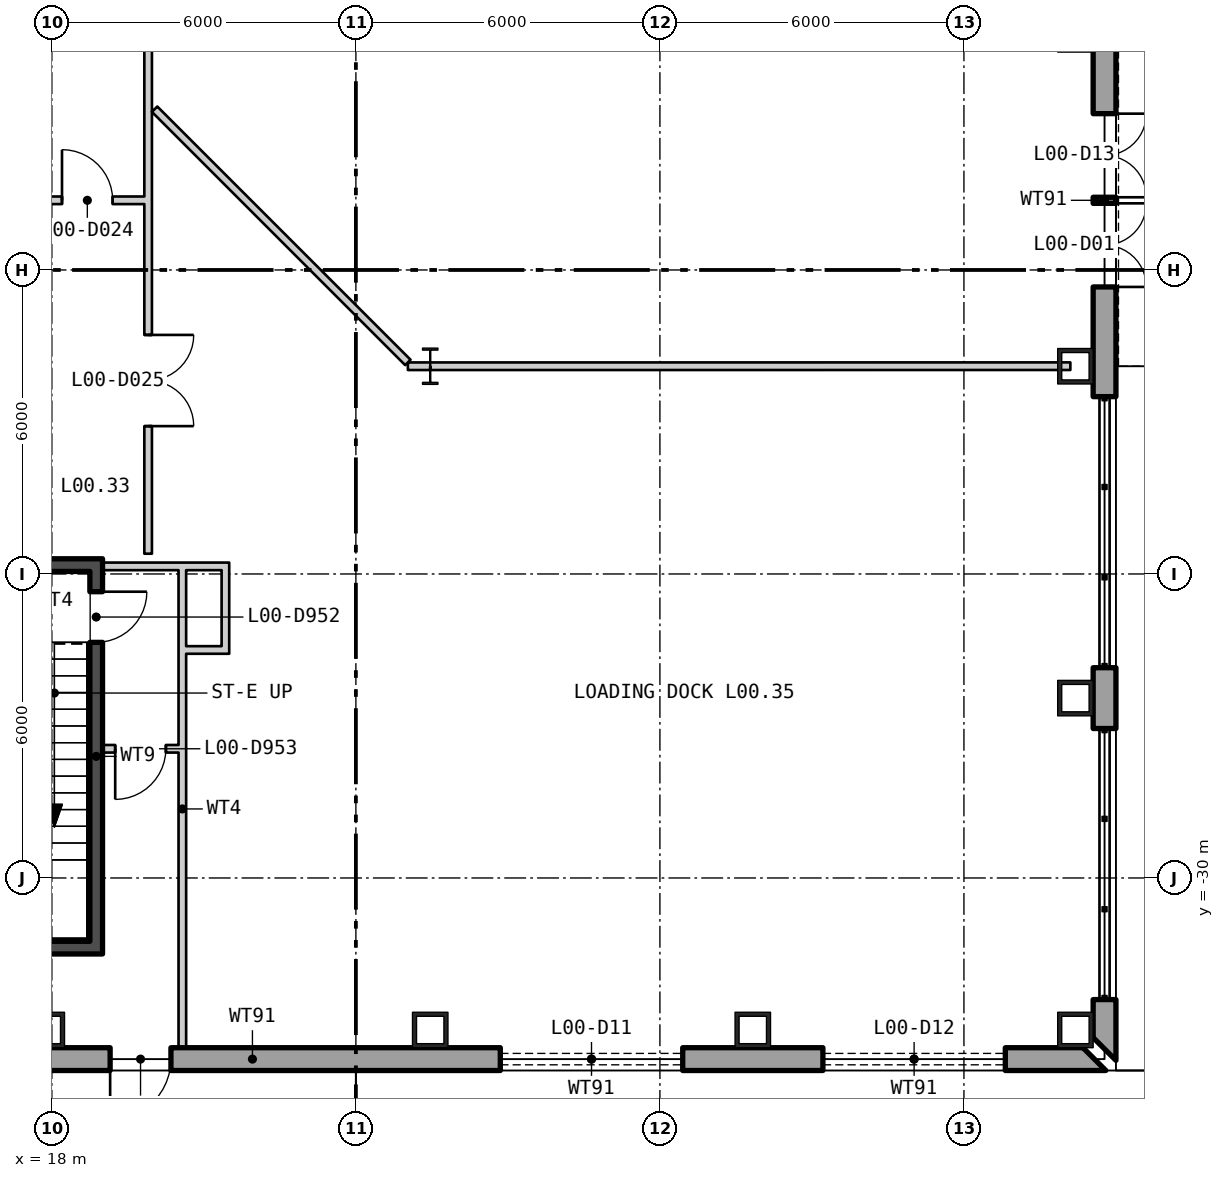
"""IFC4 building model, lengths in metres.
Left out: names, types, materials, properties, quantities, classifications, styles, units other than length and angle.
Written with IfcOpenShell. Run it as: python <this file> out.ifc"""

import sys

from ifc_helpers import new_model, si_unit, direction, frame, frame_2d, origin, origin_2d, place, context, subcontext, project, spatial, polyline, rectangle, hollow_rectangle, i_section, outline, extrude, element, fill, save


model = new_model("IFC4")
c1 = context("Model", 3, precision=1e-05, world=origin(), true_north=direction((0.0, 1.0)))
c2 = subcontext(c1, "Body", "Model", "MODEL_VIEW")
j1 = project(units=[si_unit("LENGTHUNIT", "METRE"), si_unit("PLANEANGLEUNIT", "RADIAN")], contexts=[c1])
p1 = place(None, origin())
s1 = spatial("IfcSite", under=j1, at=p1, CompositionType="ELEMENT")
p2 = place(p1, origin())
s2 = spatial("IfcBuilding", under=s1, at=p2, CompositionType="ELEMENT")
p3 = place(p2, origin())
s3 = spatial("IfcBuildingStorey", under=s2, at=p3, CompositionType="ELEMENT", Elevation=0.0)
for number, where, z_axis, x_axis in (
    (1, (38.2, -33.0, 0.0), (0.0, 0.0, 1.0), (0.0, 1.0, 0.0)),
    (2, (38.2, -26.45, 0.0), (0.0, 0.0, 1.0), (0.0, 1.0, 0.0)),
    (3, (38.2, -19.9, 0.0), (0.0, 0.0, 1.0), (0.0, 1.0, 0.0)),
    (4, (17.9, -33.0, 0.0), (0.0, 0.0, 1.0), (1.0, 0.0, 0.0)),
    (5, (25.467, -33.0, 0.0), (0.0, 0.0, 1.0), (1.0, 0.0, 0.0)),
    (6, (31.833, -33.0, 0.0), (0.0, 0.0, 1.0), (1.0, 0.0, 0.0)),
):
    element("IfcColumn", number, at=place(p3, frame(where, z_axis=z_axis, x_axis=x_axis)), inside=s3, PredefinedType="COLUMN", context=c2, shape_type="SweptSolid", body=[
        extrude(hollow_rectangle(XDim=0.7, YDim=0.7, WallThickness=0.08, at=origin_2d()), origin(), (0.0, 0.0, 1.0), 8.4),
    ])
p4 = place(p3, frame((25.467, -19.9, 0.0), z_axis=(0.0, 0.0, 1.0), x_axis=(1.0, 0.0, 0.0)))
e7 = element("IfcColumn", 7, at=p4, inside=s3, PredefinedType="COLUMN", context=c2, shape_type="SweptSolid", body=[
    extrude(i_section(OverallWidth=0.304, OverallDepth=0.716, WebThickness=0.021, FlangeThickness=0.04, at=origin_2d()), origin(), (0.0, 0.0, 1.0), 8.4),
])
p5 = place(p3, frame((38.775, -33.575, 5.4), z_axis=(0.0, 0.0, 1.0), x_axis=(0.0, 1.0, 0.0)))
e8 = element("IfcWall", 8, at=p5, inside=s3, PredefinedType="SOLIDWALL", context=c2, shape_type="SweptSolid", body=[
    extrude(outline(polyline([(-0.225, -0.225), (53.775, -0.225), (53.325, 0.225), (0.225, 0.225), (-0.225, -0.225)])), origin(), (0.0, 0.0, 1.0), 2.6),
])
p6 = place(p3, frame((38.775, -33.375, -0.4), z_axis=(0.0, 0.0, 1.0), x_axis=(0.0, 1.0, 0.0)))
e9 = element("IfcWall", 9, at=p6, inside=s3, PredefinedType="SOLIDWALL", context=c2, shape_type="SweptSolid", body=[
    extrude(outline(polyline([(-0.225, -0.225), (0.975, -0.225), (0.975, 0.225), (0.225, 0.225), (-0.225, -0.225)])), origin(), (0.0, 0.0, 1.0), 5.8),
])
p7 = place(p3, frame((38.775, -27.05, -0.4), z_axis=(0.0, 0.0, 1.0), x_axis=(0.0, 1.0, 0.0)))
e10 = element("IfcWall", 10, at=p7, inside=s3, PredefinedType="SOLIDWALL", context=c2, shape_type="SweptSolid", body=[
    extrude(outline(polyline([(0.0, -0.225), (1.2, -0.225), (1.2, 0.225), (0.0, 0.225), (0.0, -0.225)])), origin(), (0.0, 0.0, 1.0), 5.8),
])
for number, where, z_axis, x_axis in (
    (11, (38.775, -20.5, -0.4), (0.0, 0.0, 1.0), (0.0, 1.0, 0.0)),
    (12, (38.775, -13.95, -0.4), (0.0, 0.0, 1.0), (0.0, 1.0, 0.0)),
):
    element("IfcWall", number, at=place(p3, frame(where, z_axis=z_axis, x_axis=x_axis)), inside=s3, PredefinedType="SOLIDWALL", context=c2, shape_type="SweptSolid", body=[
        extrude(outline(polyline([(0.0, -0.225), (1.2, -0.225), (1.2, 0.225), (0.0, 0.225), (0.0, -0.225)])), origin(), (0.0, 0.0, 1.0), 5.51),
    ])
for number, where, z_axis, x_axis in (
    (13, (38.775, -32.4, -0.4), (0.0, 0.0, 1.0), (0.0, 1.0, 0.0)),
    (14, (38.775, -25.85, -0.4), (0.0, 0.0, 1.0), (0.0, 1.0, 0.0)),
):
    element("IfcWall", number, at=place(p3, frame(where, z_axis=z_axis, x_axis=x_axis)), inside=s3, PredefinedType="SOLIDWALL", context=c2, shape_type="SweptSolid", body=[
        extrude(outline(polyline([(0.0, -0.225), (5.35, -0.225), (5.35, 0.225), (0.0, 0.225), (0.0, -0.225)])), origin(), (0.0, 0.0, 1.0), 1.0),
    ])
p8 = place(p3, frame((38.775, -19.3, -0.4), z_axis=(0.0, 0.0, 1.0), x_axis=(0.0, 1.0, 0.0)))
e15 = element("IfcWall", 15, at=p8, inside=s3, PredefinedType="SOLIDWALL", context=c2, shape_type="SweptSolid", body=[
    extrude(outline(polyline([(0.0, -0.225), (5.35, -0.225), (5.35, 0.225), (0.0, 0.225), (0.0, -0.225)])), origin(), (0.0, 0.0, 1.0), 5.8),
])
p9 = place(p8, frame((0.965, 0.0, 0.4)))
e16 = element("IfcOpeningElement", 16, at=p9, cuts=e15, PredefinedType="OPENING", context=c2, shape_type="SweptSolid", body=[
    extrude(rectangle(XDim=1.65, YDim=3.0, at=frame_2d((0.825, 1.5))), frame((0.0, 0.235, 0.0), z_axis=(0.0, -1.0, 0.0), x_axis=(1.0, 0.0, 0.0)), (0.0, 0.0, 1.0), 0.47),
])
p10 = place(p8, frame((2.735, 0.0, 0.4)))
e17 = element("IfcOpeningElement", 17, at=p10, cuts=e15, PredefinedType="OPENING", context=c2, shape_type="SweptSolid", body=[
    extrude(rectangle(XDim=1.65, YDim=3.0, at=frame_2d((0.825, 1.5))), frame((0.0, 0.235, 0.0), z_axis=(0.0, -1.0, 0.0), x_axis=(1.0, 0.0, 0.0)), (0.0, 0.0, 1.0), 0.47),
])
p11 = place(p3, frame((-38.775, -33.575, 5.4), z_axis=(0.0, 0.0, 1.0), x_axis=(1.0, 0.0, 0.0)))
e18 = element("IfcWall", 18, at=p11, inside=s3, PredefinedType="SOLIDWALL", context=c2, shape_type="SweptSolid", body=[
    extrude(outline(polyline([(-0.225, -0.225), (77.775, -0.225), (77.325, 0.225), (0.225, 0.225), (-0.225, -0.225)])), origin(), (0.0, 0.0, 1.0), 2.6),
])
p12 = place(p3, frame((18.5, -33.575, -0.4), z_axis=(0.0, 0.0, 1.0), x_axis=(1.0, 0.0, 0.0)))
e19 = element("IfcWall", 19, at=p12, inside=s3, PredefinedType="SOLIDWALL", context=c2, shape_type="SweptSolid", body=[
    extrude(outline(polyline([(0.0, -0.225), (0.55, -0.225), (0.55, 0.225), (0.0, 0.225), (0.0, -0.225)])), origin(), (0.0, 0.0, 1.0), 5.8),
])
for number, where, z_axis, x_axis in (
    (20, (24.867, -33.575, -0.4), (0.0, 0.0, 1.0), (1.0, 0.0, 0.0)),
    (21, (31.233, -33.575, -0.4), (0.0, 0.0, 1.0), (1.0, 0.0, 0.0)),
):
    element("IfcWall", number, at=place(p3, frame(where, z_axis=z_axis, x_axis=x_axis)), inside=s3, PredefinedType="SOLIDWALL", context=c2, shape_type="SweptSolid", body=[
        extrude(outline(polyline([(0.0, -0.225), (1.2, -0.225), (1.2, 0.225), (0.0, 0.225), (0.0, -0.225)])), origin(), (0.0, 0.0, 1.0), 5.8),
    ])
p13 = place(p3, frame((37.6, -33.575, -0.4), z_axis=(0.0, 0.0, 1.0), x_axis=(1.0, 0.0, 0.0)))
e22 = element("IfcWall", 22, at=p13, inside=s3, PredefinedType="SOLIDWALL", context=c2, shape_type="SweptSolid", body=[
    extrude(outline(polyline([(0.0, -0.225), (1.2, -0.225), (0.75, 0.225), (0.0, 0.225), (0.0, -0.225)])), origin(), (0.0, 0.0, 1.0), 5.8),
])
p14 = place(p3, frame((13.333, -33.575, -0.4), z_axis=(0.0, 0.0, 1.0), x_axis=(1.0, 0.0, 0.0)))
e23 = element("IfcWall", 23, at=p14, inside=s3, PredefinedType="SOLIDWALL", context=c2, shape_type="SweptSolid", body=[
    extrude(outline(polyline([(0.0, -0.225), (5.167, -0.225), (5.167, 0.225), (0.0, 0.225), (0.0, -0.225)])), origin(), (0.0, 0.0, 1.0), 5.8),
])
p15 = place(p14, frame((0.817, 0.0, 0.4)))
e24 = element("IfcOpeningElement", 24, at=p15, cuts=e23, PredefinedType="OPENING", context=c2, shape_type="SweptSolid", body=[
    extrude(rectangle(XDim=1.2, YDim=2.4, at=frame_2d((0.6, 1.2))), frame((0.0, 0.235, 0.0), z_axis=(0.0, -1.0, 0.0), x_axis=(1.0, 0.0, 0.0)), (0.0, 0.0, 1.0), 0.47),
])
p16 = place(p3, frame((19.05, -33.575, -0.4), z_axis=(0.0, 0.0, 1.0), x_axis=(1.0, 0.0, 0.0)))
e25 = element("IfcWall", 25, at=p16, inside=s3, PredefinedType="SOLIDWALL", context=c2, shape_type="SweptSolid", body=[
    extrude(outline(polyline([(0.0, -0.225), (5.817, -0.225), (5.817, 0.225), (0.0, 0.225), (0.0, -0.225)])), origin(), (0.0, 0.0, 1.0), 5.8),
])
p17 = place(p16, frame((0.1, 0.0, 0.4)))
e26 = element("IfcOpeningElement", 26, at=p17, cuts=e25, PredefinedType="OPENING", context=c2, shape_type="SweptSolid", body=[
    extrude(rectangle(XDim=1.2, YDim=2.4, at=frame_2d((0.6, 1.2))), frame((0.0, 0.235, 0.0), z_axis=(0.0, -1.0, 0.0), x_axis=(1.0, 0.0, 0.0)), (0.0, 0.0, 1.0), 0.47),
])
p18 = place(p3, frame((26.067, -33.575, -0.4), z_axis=(0.0, 0.0, 1.0), x_axis=(1.0, 0.0, 0.0)))
e27 = element("IfcWall", 27, at=p18, inside=s3, PredefinedType="SOLIDWALL", context=c2, shape_type="SweptSolid", body=[
    extrude(outline(polyline([(0.0, -0.225), (5.167, -0.225), (5.167, 0.225), (0.0, 0.225), (0.0, -0.225)])), origin(), (0.0, 0.0, 1.0), 5.8),
])
p19 = place(p18, frame((0.783, 0.0, 0.4)))
e28 = element("IfcOpeningElement", 28, at=p19, cuts=e27, PredefinedType="OPENING", context=c2, shape_type="SweptSolid", body=[
    extrude(rectangle(XDim=3.6, YDim=4.2, at=frame_2d((1.8, 2.1))), frame((0.0, 0.235, 0.0), z_axis=(0.0, -1.0, 0.0), x_axis=(1.0, 0.0, 0.0)), (0.0, 0.0, 1.0), 0.47),
])
p20 = place(p3, frame((32.433, -33.575, -0.4), z_axis=(0.0, 0.0, 1.0), x_axis=(1.0, 0.0, 0.0)))
e29 = element("IfcWall", 29, at=p20, inside=s3, PredefinedType="SOLIDWALL", context=c2, shape_type="SweptSolid", body=[
    extrude(outline(polyline([(0.0, -0.225), (5.167, -0.225), (5.167, 0.225), (0.0, 0.225), (0.0, -0.225)])), origin(), (0.0, 0.0, 1.0), 5.8),
])
p21 = place(p20, frame((0.783, 0.0, 0.4)))
e30 = element("IfcOpeningElement", 30, at=p21, cuts=e29, PredefinedType="OPENING", context=c2, shape_type="SweptSolid", body=[
    extrude(rectangle(XDim=3.6, YDim=4.2, at=frame_2d((1.8, 2.1))), frame((0.0, 0.235, 0.0), z_axis=(0.0, -1.0, 0.0), x_axis=(1.0, 0.0, 0.0)), (0.0, 0.0, 1.0), 0.47),
])
p22 = place(p3, frame((18.875, -31.25, 0.0), z_axis=(0.0, 0.0, 1.0), x_axis=(0.0, 1.0, 0.0)))
e31 = element("IfcWall", 31, at=p22, inside=s3, PredefinedType="SHEAR", context=c2, shape_type="SweptSolid", body=[
    extrude(rectangle(XDim=7.3, YDim=0.25, at=frame_2d((3.65, 0.0))), origin(), (0.0, 0.0, 1.0), 8.18),
])
p23 = place(p22, frame((5.9, 0.0, 0.0)))
e32 = element("IfcOpeningElement", 32, at=p23, cuts=e31, PredefinedType="OPENING", context=c2, shape_type="SweptSolid", body=[
    extrude(rectangle(XDim=1.0, YDim=2.1, at=frame_2d((0.5, 1.05))), frame((0.0, 0.135, 0.0), z_axis=(0.0, -1.0, 0.0), x_axis=(1.0, 0.0, 0.0)), (0.0, 0.0, 1.0), 0.27),
])
for number, where, z_axis, x_axis in (
    (33, (15.5, -31.375, 0.0), (0.0, 0.0, 1.0), (1.0, 0.0, 0.0)),
    (34, (15.5, -23.825, 0.0), (0.0, 0.0, 1.0), (1.0, 0.0, 0.0)),
):
    element("IfcWall", number, at=place(p3, frame(where, z_axis=z_axis, x_axis=x_axis)), inside=s3, PredefinedType="SHEAR", context=c2, shape_type="SweptSolid", body=[
        extrude(rectangle(XDim=3.5, YDim=0.25, at=frame_2d((1.75, 0.0))), origin(), (0.0, 0.0, 1.0), 8.18),
    ])
p24 = place(p3, frame((20.575, -33.35, 0.0), z_axis=(0.0, 0.0, 1.0), x_axis=(0.0, 1.0, 0.0)))
e35 = element("IfcWall", 35, at=p24, inside=s3, PredefinedType="PARTITIONING", context=c2, shape_type="SweptSolid", body=[
    extrude(rectangle(XDim=9.425, YDim=0.15, at=frame_2d((4.713, 0.0))), origin(), (0.0, 0.0, 1.0), 8.18),
])
p25 = place(p3, frame((19.0, -23.85, 0.0), z_axis=(0.0, 0.0, 1.0), x_axis=(1.0, 0.0, 0.0)))
e36 = element("IfcWall", 36, at=p25, inside=s3, PredefinedType="PARTITIONING", context=c2, shape_type="SweptSolid", body=[
    extrude(rectangle(XDim=2.35, YDim=0.15, at=frame_2d((1.175, 0.0))), origin(), (0.0, 0.0, 1.0), 8.18),
])
p26 = place(p3, frame((19.0, -27.45, 0.0), z_axis=(0.0, 0.0, 1.0), x_axis=(1.0, 0.0, 0.0)))
e37 = element("IfcWall", 37, at=p26, inside=s3, PredefinedType="PARTITIONING", context=c2, shape_type="SweptSolid", body=[
    extrude(rectangle(XDim=1.5, YDim=0.15, at=frame_2d((0.75, 0.0))), origin(), (0.0, 0.0, 1.0), 8.18),
])
p27 = place(p26, frame((0.25, 0.0, 0.0)))
e38 = element("IfcOpeningElement", 38, at=p27, cuts=e37, PredefinedType="OPENING", context=c2, shape_type="SweptSolid", body=[
    extrude(rectangle(XDim=1.0, YDim=2.1, at=frame_2d((0.5, 1.05))), frame((0.0, 0.085, 0.0), z_axis=(0.0, -1.0, 0.0), x_axis=(1.0, 0.0, 0.0)), (0.0, 0.0, 1.0), 0.17),
])
p28 = place(p3, frame((21.425, -25.575, 0.0), z_axis=(0.0, 0.0, 1.0), x_axis=(0.0, 1.0, 0.0)))
e39 = element("IfcWall", 39, at=p28, inside=s3, PredefinedType="PARTITIONING", context=c2, shape_type="SweptSolid", body=[
    extrude(rectangle(XDim=1.8, YDim=0.15, at=frame_2d((0.9, 0.0))), origin(), (0.0, 0.0, 1.0), 8.18),
])
p29 = place(p3, frame((20.65, -25.5, 0.0), z_axis=(0.0, 0.0, 1.0), x_axis=(1.0, 0.0, 0.0)))
e40 = element("IfcWall", 40, at=p29, inside=s3, PredefinedType="PARTITIONING", context=c2, shape_type="SweptSolid", body=[
    extrude(rectangle(XDim=0.7, YDim=0.15, at=frame_2d((0.35, 0.0))), origin(), (0.0, 0.0, 1.0), 8.18),
])
p30 = place(p3, frame((17.575, -16.625, 0.0), z_axis=(0.0, 0.0, 1.0), x_axis=(1.0, 0.0, 0.0)))
e41 = element("IfcWall", 41, at=p30, inside=s3, PredefinedType="PARTITIONING", context=c2, shape_type="SweptSolid", body=[
    extrude(rectangle(XDim=2.25, YDim=0.15, at=frame_2d((1.125, 0.0))), origin(), (0.0, 0.0, 1.0), 8.18),
])
p31 = place(p30, frame((0.625, 0.0, 0.0)))
e42 = element("IfcOpeningElement", 42, at=p31, cuts=e41, PredefinedType="OPENING", context=c2, shape_type="SweptSolid", body=[
    extrude(rectangle(XDim=1.0, YDim=2.1, at=frame_2d((0.5, 1.05))), frame((0.0, 0.085, 0.0), z_axis=(0.0, -1.0, 0.0), x_axis=(1.0, 0.0, 0.0)), (0.0, 0.0, 1.0), 0.17),
])
p32 = place(p3, frame((19.9, -23.6, 0.0), z_axis=(0.0, 0.0, 1.0), x_axis=(0.0, 1.0, 0.0)))
e43 = element("IfcWall", 43, at=p32, inside=s3, PredefinedType="PARTITIONING", context=c2, shape_type="SweptSolid", body=[
    extrude(rectangle(XDim=21.012, YDim=0.15, at=frame_2d((10.506, 0.0))), origin(), (0.0, 0.0, 1.0), 8.18),
])
p33 = place(p32, frame((2.518, 0.0, 0.0)))
e44 = element("IfcOpeningElement", 44, at=p33, cuts=e43, PredefinedType="OPENING", context=c2, shape_type="SweptSolid", body=[
    extrude(rectangle(XDim=1.8, YDim=2.1, at=frame_2d((0.9, 1.05))), frame((0.0, 0.085, 0.0), z_axis=(0.0, -1.0, 0.0), x_axis=(1.0, 0.0, 0.0)), (0.0, 0.0, 1.0), 0.17),
])
p34 = place(p32, frame((11.823, 0.0, 0.0)))
e45 = element("IfcOpeningElement", 45, at=p34, cuts=e43, PredefinedType="OPENING", context=c2, shape_type="SweptSolid", body=[
    extrude(rectangle(XDim=1.8, YDim=2.1, at=frame_2d((0.9, 1.05))), frame((0.0, 0.085, 0.0), z_axis=(0.0, -1.0, 0.0), x_axis=(1.0, 0.0, 0.0)), (0.0, 0.0, 1.0), 0.17),
])
p35 = place(p3, frame((20.028, -14.827, 0.0), z_axis=(0.0, 0.0, 1.0), x_axis=(0.707106781187, -0.707106781187, 0.0)))
e46 = element("IfcWall", 46, at=p35, inside=s3, PredefinedType="PARTITIONING", context=c2, shape_type="SweptSolid", body=[
    extrude(rectangle(XDim=7.068, YDim=0.15, at=frame_2d((3.534, 0.0))), origin(), (0.0, 0.0, 1.0), 8.18),
])
p36 = place(p3, frame((25.026, -19.9, 0.0), z_axis=(0.0, 0.0, 1.0), x_axis=(1.0, 0.0, 0.0)))
e47 = element("IfcWall", 47, at=p36, inside=s3, PredefinedType="PARTITIONING", context=c2, shape_type="SweptSolid", body=[
    extrude(rectangle(XDim=0.441, YDim=0.15, at=frame_2d((0.221, 0.0))), origin(), (0.0, 0.0, 1.0), 8.18),
])
p37 = place(p3, frame((25.467, -19.9, 0.0), z_axis=(0.0, 0.0, 1.0), x_axis=(0.999999996867, 7.9157761e-05, 0.0)))
e48 = element("IfcWall", 48, at=p37, inside=s3, PredefinedType="PARTITIONING", context=c2, shape_type="SweptSolid", body=[
    extrude(rectangle(XDim=12.633, YDim=0.15, at=frame_2d((6.316, 0.0))), origin(), (0.0, 0.0, 1.0), 7.39),
])
p38 = place(p9, frame((1.65, 0.0, 0.0), z_axis=(0.0, 0.0, 1.0), x_axis=(-1.0, 0.0, 0.0)))
e49 = element("IfcDoor", 49, at=p38, inside=s3, OperationType="DOUBLE_DOOR_DOUBLE_SWING", PredefinedType="DOOR", context=c2, shape_type="SweptSolid", body=[
    extrude(rectangle(XDim=1.65, YDim=3.0, at=frame_2d((0.825, 1.5))), frame((0.0, 0.025, 0.0), z_axis=(0.0, -1.0, 0.0), x_axis=(1.0, 0.0, 0.0)), (0.0, 0.0, 1.0), 0.05),
])
fill(e16, e49)
p39 = place(p10, frame((1.65, 0.0, 0.0), z_axis=(0.0, 0.0, 1.0), x_axis=(-1.0, 0.0, 0.0)))
e50 = element("IfcDoor", 50, at=p39, inside=s3, OperationType="DOUBLE_DOOR_DOUBLE_SWING", PredefinedType="DOOR", context=c2, shape_type="SweptSolid", body=[
    extrude(rectangle(XDim=1.65, YDim=3.0, at=frame_2d((0.825, 1.5))), frame((0.0, 0.025, 0.0), z_axis=(0.0, -1.0, 0.0), x_axis=(1.0, 0.0, 0.0)), (0.0, 0.0, 1.0), 0.05),
])
fill(e17, e50)
p40 = place(p17, frame((1.2, 0.0, 0.0), z_axis=(0.0, 0.0, 1.0), x_axis=(-1.0, 0.0, 0.0)))
e51 = element("IfcDoor", 51, at=p40, inside=s3, OperationType="SINGLE_SWING_LEFT", PredefinedType="DOOR", context=c2, shape_type="SweptSolid", body=[
    extrude(rectangle(XDim=1.2, YDim=2.4, at=frame_2d((0.6, 1.2))), frame((0.0, 0.025, 0.0), z_axis=(0.0, -1.0, 0.0), x_axis=(1.0, 0.0, 0.0)), (0.0, 0.0, 1.0), 0.05),
])
fill(e26, e51)
p41 = place(p19, frame((3.6, 0.0, 0.0), z_axis=(0.0, 0.0, 1.0), x_axis=(-1.0, 0.0, 0.0)))
e52 = element("IfcDoor", 52, at=p41, inside=s3, OperationType="ROLLINGUP", PredefinedType="GATE", context=c2, shape_type="SweptSolid", body=[
    extrude(rectangle(XDim=3.6, YDim=4.2, at=frame_2d((1.8, 2.1))), frame((0.0, 0.025, 0.0), z_axis=(0.0, -1.0, 0.0), x_axis=(1.0, 0.0, 0.0)), (0.0, 0.0, 1.0), 0.05),
])
fill(e28, e52)
p42 = place(p21, frame((3.6, 0.0, 0.0), z_axis=(0.0, 0.0, 1.0), x_axis=(-1.0, 0.0, 0.0)))
e53 = element("IfcDoor", 53, at=p42, inside=s3, OperationType="ROLLINGUP", PredefinedType="GATE", context=c2, shape_type="SweptSolid", body=[
    extrude(rectangle(XDim=3.6, YDim=4.2, at=frame_2d((1.8, 2.1))), frame((0.0, 0.025, 0.0), z_axis=(0.0, -1.0, 0.0), x_axis=(1.0, 0.0, 0.0)), (0.0, 0.0, 1.0), 0.05),
])
fill(e30, e53)
p43 = place(p23, origin())
e54 = element("IfcDoor", 54, at=p43, inside=s3, OperationType="SINGLE_SWING_RIGHT", PredefinedType="DOOR", context=c2, shape_type="SweptSolid", body=[
    extrude(rectangle(XDim=1.0, YDim=2.1, at=frame_2d((0.5, 1.05))), frame((0.0, 0.025, 0.0), z_axis=(0.0, -1.0, 0.0), x_axis=(1.0, 0.0, 0.0)), (0.0, 0.0, 1.0), 0.05),
])
fill(e32, e54)
p44 = place(p27, origin())
e55 = element("IfcDoor", 55, at=p44, inside=s3, OperationType="SINGLE_SWING_LEFT", PredefinedType="DOOR", context=c2, shape_type="SweptSolid", body=[
    extrude(rectangle(XDim=1.0, YDim=2.1, at=frame_2d((0.5, 1.05))), frame((0.0, 0.025, 0.0), z_axis=(0.0, -1.0, 0.0), x_axis=(1.0, 0.0, 0.0)), (0.0, 0.0, 1.0), 0.05),
])
fill(e38, e55)
p45 = place(p31, origin())
e56 = element("IfcDoor", 56, at=p45, inside=s3, OperationType="SINGLE_SWING_RIGHT", PredefinedType="DOOR", context=c2, shape_type="SweptSolid", body=[
    extrude(rectangle(XDim=1.0, YDim=2.1, at=frame_2d((0.5, 1.05))), frame((0.0, 0.025, 0.0), z_axis=(0.0, -1.0, 0.0), x_axis=(1.0, 0.0, 0.0)), (0.0, 0.0, 1.0), 0.05),
])
fill(e42, e56)
p46 = place(p33, origin())
e57 = element("IfcDoor", 57, at=p46, inside=s3, OperationType="DOUBLE_DOOR_SINGLE_SWING", PredefinedType="DOOR", context=c2, shape_type="SweptSolid", body=[
    extrude(rectangle(XDim=1.8, YDim=2.1, at=frame_2d((0.9, 1.05))), frame((0.0, 0.025, 0.0), z_axis=(0.0, -1.0, 0.0), x_axis=(1.0, 0.0, 0.0)), (0.0, 0.0, 1.0), 0.05),
])
fill(e44, e57)
save(model, sys.argv[1])
